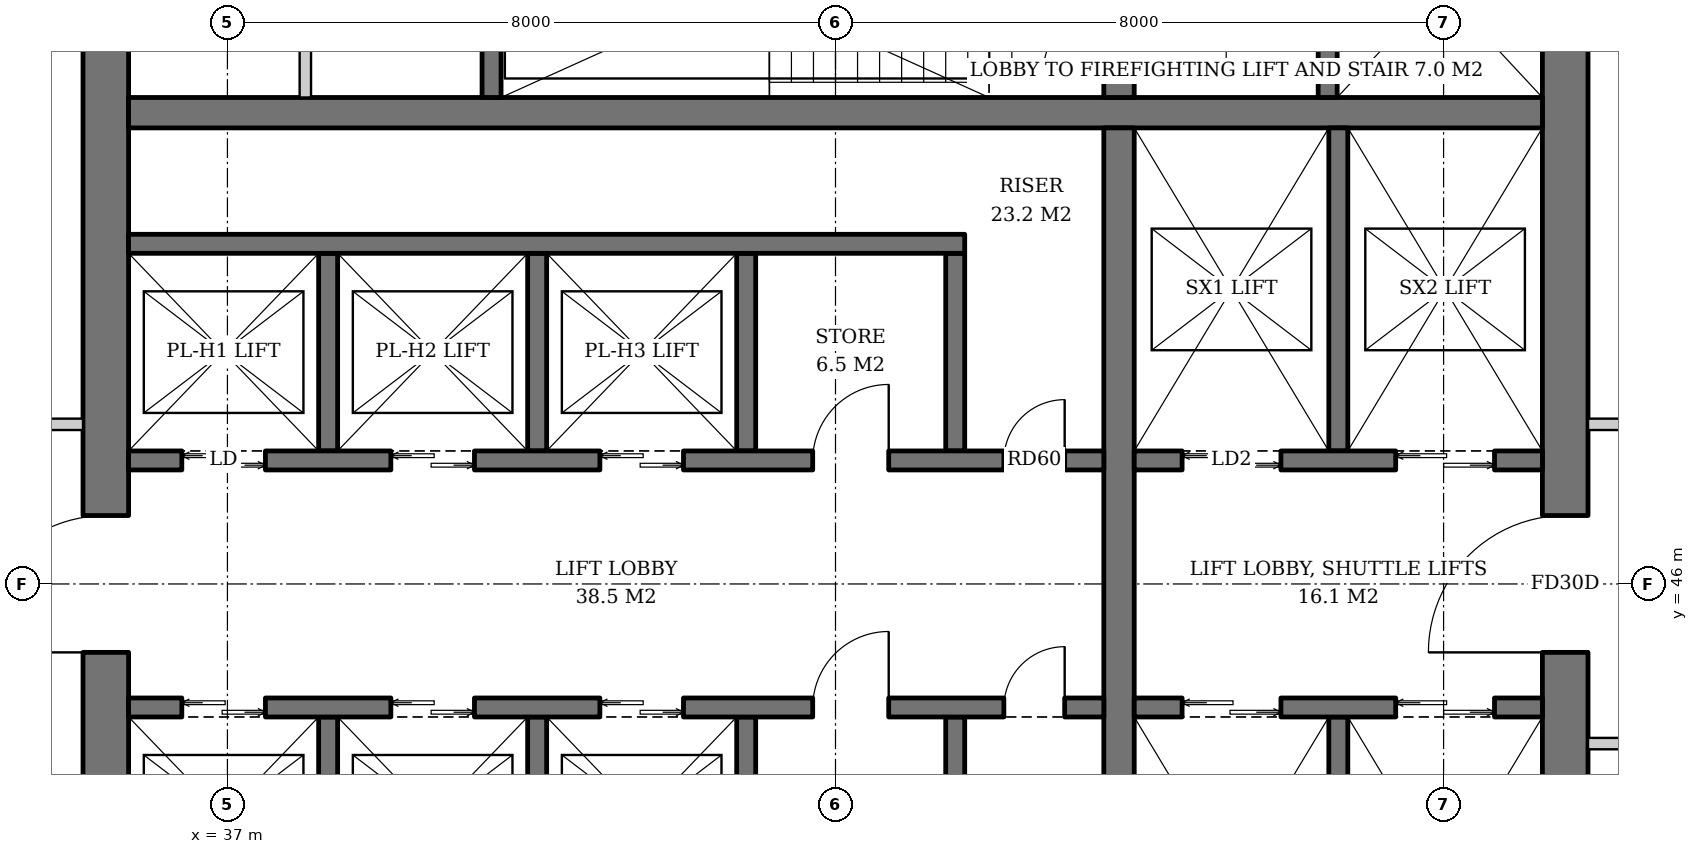
"""IFC4 building model, lengths in metres.
Left out: names, types, materials, properties, quantities, classifications, styles, units other than length and angle.
Written with IfcOpenShell. Run it as: python <this file> out.ifc"""

import sys

from ifc_helpers import new_model, si_unit, direction, frame, frame_2d, origin, place, context, subcontext, project, spatial, rectangle, extrude, element, fill, save


model = new_model("IFC4")
c1 = context("Model", 3, precision=1e-05, world=origin(), true_north=direction((0.0, 1.0)))
c2 = subcontext(c1, "Body", "Model", "MODEL_VIEW")
j1 = project(units=[si_unit("LENGTHUNIT", "METRE"), si_unit("PLANEANGLEUNIT", "RADIAN")], contexts=[c1])
p1 = place(None, origin())
s1 = spatial("IfcSite", under=j1, at=p1, CompositionType="ELEMENT")
p2 = place(p1, origin())
s2 = spatial("IfcBuilding", under=s1, at=p2, CompositionType="ELEMENT")
p3 = place(p2, frame((0.0, 0.0, 169.2)))
s3 = spatial("IfcBuildingStorey", under=s2, at=p3, CompositionType="ELEMENT", Elevation=169.2)
p4 = place(p3, frame((35.4, 36.7, 0.0), z_axis=(0.0, 0.0, 1.0), x_axis=(0.0, 1.0, 0.0)))
e1 = element("IfcWall", 1, at=p4, inside=s3, PredefinedType="SHEAR", context=c2, shape_type="SweptSolid", body=[
    extrude(rectangle(XDim=18.6, YDim=0.6, at=frame_2d((9.3, 0.0))), origin(), (0.0, 0.0, 1.0), 3.8),
])
p5 = place(p4, frame((8.4, 0.0, 0.0)))
e2 = element("IfcOpeningElement", 2, at=p5, cuts=e1, PredefinedType="OPENING", context=c2, shape_type="SweptSolid", body=[
    extrude(rectangle(XDim=1.8, YDim=2.4, at=frame_2d((0.9, 1.2))), frame((0.0, 0.31, 0.0), z_axis=(0.0, -1.0, 0.0), x_axis=(1.0, 0.0, 0.0)), (0.0, 0.0, 1.0), 0.62),
])
p6 = place(p3, frame((54.6, 36.7, 0.0), z_axis=(0.0, 0.0, 1.0), x_axis=(0.0, 1.0, 0.0)))
e3 = element("IfcWall", 3, at=p6, inside=s3, PredefinedType="SHEAR", context=c2, shape_type="SweptSolid", body=[
    extrude(rectangle(XDim=18.6, YDim=0.6, at=frame_2d((9.3, 0.0))), origin(), (0.0, 0.0, 1.0), 3.8),
])
p7 = place(p6, frame((8.4, 0.0, 0.0)))
e4 = element("IfcOpeningElement", 4, at=p7, cuts=e3, PredefinedType="OPENING", context=c2, shape_type="SweptSolid", body=[
    extrude(rectangle(XDim=1.8, YDim=2.4, at=frame_2d((0.9, 1.2))), frame((0.0, 0.31, 0.0), z_axis=(0.0, -1.0, 0.0), x_axis=(1.0, 0.0, 0.0)), (0.0, 0.0, 1.0), 0.62),
])
p8 = place(p3, frame((35.7, 52.2, 0.0), z_axis=(0.0, 0.0, 1.0), x_axis=(1.0, 0.0, 0.0)))
e5 = element("IfcWall", 5, at=p8, inside=s3, PredefinedType="SHEAR", context=c2, shape_type="SweptSolid", body=[
    extrude(rectangle(XDim=18.6, YDim=0.4, at=frame_2d((9.3, 0.0))), origin(), (0.0, 0.0, 1.0), 3.8),
])
p9 = place(p3, frame((48.73, 40.0, 0.0), z_axis=(0.0, 0.0, 1.0), x_axis=(0.0, 1.0, 0.0)))
e6 = element("IfcWall", 6, at=p9, inside=s3, PredefinedType="SHEAR", context=c2, shape_type="SweptSolid", body=[
    extrude(rectangle(XDim=12.0, YDim=0.4, at=frame_2d((6.0, 0.0))), origin(), (0.0, 0.0, 1.0), 3.8),
])
p10 = place(p3, frame((48.73, 52.4, 0.0), z_axis=(0.0, 0.0, 1.0), x_axis=(0.0, 1.0, 0.0)))
e7 = element("IfcWall", 7, at=p10, inside=s3, PredefinedType="SHEAR", context=c2, shape_type="SweptSolid", body=[
    extrude(rectangle(XDim=2.9, YDim=0.4, at=frame_2d((1.45, 0.0))), origin(), (0.0, 0.0, 1.0), 3.8),
])
p11 = place(p10, frame((0.3, 0.0, 0.0)))
e8 = element("IfcOpeningElement", 8, at=p11, cuts=e7, PredefinedType="OPENING", context=c2, shape_type="SweptSolid", body=[
    extrude(rectangle(XDim=1.0, YDim=2.1, at=frame_2d((0.5, 1.05))), frame((0.0, 0.21, 0.0), z_axis=(0.0, -1.0, 0.0), x_axis=(1.0, 0.0, 0.0)), (0.0, 0.0, 1.0), 0.42),
])
p12 = place(p3, frame((40.475, 52.4, 0.0), z_axis=(0.0, 0.0, 1.0), x_axis=(0.0, 1.0, 0.0)))
e9 = element("IfcWall", 9, at=p12, inside=s3, PredefinedType="SHEAR", context=c2, shape_type="SweptSolid", body=[
    extrude(rectangle(XDim=2.9, YDim=0.25, at=frame_2d((1.45, 0.0))), origin(), (0.0, 0.0, 1.0), 3.8),
])
p13 = place(p3, frame((51.475, 52.4, 0.0), z_axis=(0.0, 0.0, 1.0), x_axis=(0.0, 1.0, 0.0)))
e10 = element("IfcWall", 10, at=p13, inside=s3, PredefinedType="SHEAR", context=c2, shape_type="SweptSolid", body=[
    extrude(rectangle(XDim=2.9, YDim=0.25, at=frame_2d((1.45, 0.0))), origin(), (0.0, 0.0, 1.0), 3.8),
])
p14 = place(p13, frame((0.8, 0.0, 0.0)))
e11 = element("IfcOpeningElement", 11, at=p14, cuts=e10, PredefinedType="OPENING", context=c2, shape_type="SweptSolid", body=[
    extrude(rectangle(XDim=1.3, YDim=2.2, at=frame_2d((0.65, 1.1))), frame((0.0, 0.135, 0.0), z_axis=(0.0, -1.0, 0.0), x_axis=(1.0, 0.0, 0.0)), (0.0, 0.0, 1.0), 0.27),
])
for number, where, z_axis, x_axis in (
    (12, (38.325, 47.75, 0.0), (0.0, 0.0, 1.0), (0.0, 1.0, 0.0)),
    (13, (41.075, 47.75, 0.0), (0.0, 0.0, 1.0), (0.0, 1.0, 0.0)),
    (14, (43.825, 47.75, 0.0), (0.0, 0.0, 1.0), (0.0, 1.0, 0.0)),
    (15, (46.575, 47.75, 0.0), (0.0, 0.0, 1.0), (0.0, 1.0, 0.0)),
):
    element("IfcWall", number, at=place(p3, frame(where, z_axis=z_axis, x_axis=x_axis)), inside=s3, PredefinedType="SHEAR", context=c2, shape_type="SweptSolid", body=[
        extrude(rectangle(XDim=2.6, YDim=0.25, at=frame_2d((1.3, 0.0))), origin(), (0.0, 0.0, 1.0), 3.8),
    ])
p15 = place(p3, frame((35.7, 50.475, 0.0), z_axis=(0.0, 0.0, 1.0), x_axis=(1.0, 0.0, 0.0)))
e16 = element("IfcWall", 16, at=p15, inside=s3, PredefinedType="SHEAR", context=c2, shape_type="SweptSolid", body=[
    extrude(rectangle(XDim=11.0, YDim=0.25, at=frame_2d((5.5, 0.0))), origin(), (0.0, 0.0, 1.0), 3.8),
])
p16 = place(p3, frame((35.7, 47.625, 0.0), z_axis=(0.0, 0.0, 1.0), x_axis=(1.0, 0.0, 0.0)))
e17 = element("IfcWall", 17, at=p16, inside=s3, PredefinedType="SHEAR", context=c2, shape_type="SweptSolid", body=[
    extrude(rectangle(XDim=12.83, YDim=0.25, at=frame_2d((6.415, 0.0))), origin(), (0.0, 0.0, 1.0), 3.8),
])
p17 = place(p16, frame((0.7, 0.0, 0.0)))
e18 = element("IfcOpeningElement", 18, at=p17, cuts=e17, PredefinedType="OPENING", context=c2, shape_type="SweptSolid", body=[
    extrude(rectangle(XDim=1.1, YDim=2.2, at=frame_2d((0.55, 1.1))), frame((0.0, 0.135, 0.0), z_axis=(0.0, -1.0, 0.0), x_axis=(1.0, 0.0, 0.0)), (0.0, 0.0, 1.0), 0.27),
])
p18 = place(p16, frame((3.45, 0.0, 0.0)))
e19 = element("IfcOpeningElement", 19, at=p18, cuts=e17, PredefinedType="OPENING", context=c2, shape_type="SweptSolid", body=[
    extrude(rectangle(XDim=1.1, YDim=2.2, at=frame_2d((0.55, 1.1))), frame((0.0, 0.135, 0.0), z_axis=(0.0, -1.0, 0.0), x_axis=(1.0, 0.0, 0.0)), (0.0, 0.0, 1.0), 0.27),
])
p19 = place(p16, frame((6.2, 0.0, 0.0)))
e20 = element("IfcOpeningElement", 20, at=p19, cuts=e17, PredefinedType="OPENING", context=c2, shape_type="SweptSolid", body=[
    extrude(rectangle(XDim=1.1, YDim=2.2, at=frame_2d((0.55, 1.1))), frame((0.0, 0.135, 0.0), z_axis=(0.0, -1.0, 0.0), x_axis=(1.0, 0.0, 0.0)), (0.0, 0.0, 1.0), 0.27),
])
p20 = place(p16, frame((9.0, 0.0, 0.0)))
e21 = element("IfcOpeningElement", 21, at=p20, cuts=e17, PredefinedType="OPENING", context=c2, shape_type="SweptSolid", body=[
    extrude(rectangle(XDim=1.0, YDim=2.1, at=frame_2d((0.5, 1.05))), frame((0.0, 0.135, 0.0), z_axis=(0.0, -1.0, 0.0), x_axis=(1.0, 0.0, 0.0)), (0.0, 0.0, 1.0), 0.27),
])
p21 = place(p16, frame((11.515, 0.0, 0.0)))
e22 = element("IfcOpeningElement", 22, at=p21, cuts=e17, PredefinedType="OPENING", context=c2, shape_type="SweptSolid", body=[
    extrude(rectangle(XDim=0.8, YDim=2.0, at=frame_2d((0.4, 1.0))), frame((0.0, 0.135, 0.0), z_axis=(0.0, -1.0, 0.0), x_axis=(1.0, 0.0, 0.0)), (0.0, 0.0, 1.0), 0.27),
])
for number, where, z_axis, x_axis in (
    (23, (38.325, 44.25, 0.0), (0.0, 0.0, 1.0), (0.0, -1.0, 0.0)),
    (24, (41.075, 44.25, 0.0), (0.0, 0.0, 1.0), (0.0, -1.0, 0.0)),
    (25, (43.825, 44.25, 0.0), (0.0, 0.0, 1.0), (0.0, -1.0, 0.0)),
    (26, (46.575, 44.25, 0.0), (0.0, 0.0, 1.0), (0.0, -1.0, 0.0)),
):
    element("IfcWall", number, at=place(p3, frame(where, z_axis=z_axis, x_axis=x_axis)), inside=s3, PredefinedType="SHEAR", context=c2, shape_type="SweptSolid", body=[
        extrude(rectangle(XDim=2.6, YDim=0.25, at=frame_2d((1.3, 0.0))), origin(), (0.0, 0.0, 1.0), 3.8),
    ])
p22 = place(p3, frame((35.7, 44.375, 0.0), z_axis=(0.0, 0.0, 1.0), x_axis=(1.0, 0.0, 0.0)))
e27 = element("IfcWall", 27, at=p22, inside=s3, PredefinedType="SHEAR", context=c2, shape_type="SweptSolid", body=[
    extrude(rectangle(XDim=12.83, YDim=0.25, at=frame_2d((6.415, 0.0))), origin(), (0.0, 0.0, 1.0), 3.8),
])
p23 = place(p22, frame((0.7, 0.0, 0.0)))
e28 = element("IfcOpeningElement", 28, at=p23, cuts=e27, PredefinedType="OPENING", context=c2, shape_type="SweptSolid", body=[
    extrude(rectangle(XDim=1.1, YDim=2.2, at=frame_2d((0.55, 1.1))), frame((0.0, 0.135, 0.0), z_axis=(0.0, -1.0, 0.0), x_axis=(1.0, 0.0, 0.0)), (0.0, 0.0, 1.0), 0.27),
])
p24 = place(p22, frame((3.45, 0.0, 0.0)))
e29 = element("IfcOpeningElement", 29, at=p24, cuts=e27, PredefinedType="OPENING", context=c2, shape_type="SweptSolid", body=[
    extrude(rectangle(XDim=1.1, YDim=2.2, at=frame_2d((0.55, 1.1))), frame((0.0, 0.135, 0.0), z_axis=(0.0, -1.0, 0.0), x_axis=(1.0, 0.0, 0.0)), (0.0, 0.0, 1.0), 0.27),
])
p25 = place(p22, frame((6.2, 0.0, 0.0)))
e30 = element("IfcOpeningElement", 30, at=p25, cuts=e27, PredefinedType="OPENING", context=c2, shape_type="SweptSolid", body=[
    extrude(rectangle(XDim=1.1, YDim=2.2, at=frame_2d((0.55, 1.1))), frame((0.0, 0.135, 0.0), z_axis=(0.0, -1.0, 0.0), x_axis=(1.0, 0.0, 0.0)), (0.0, 0.0, 1.0), 0.27),
])
p26 = place(p22, frame((9.0, 0.0, 0.0)))
e31 = element("IfcOpeningElement", 31, at=p26, cuts=e27, PredefinedType="OPENING", context=c2, shape_type="SweptSolid", body=[
    extrude(rectangle(XDim=1.0, YDim=2.1, at=frame_2d((0.5, 1.05))), frame((0.0, 0.135, 0.0), z_axis=(0.0, -1.0, 0.0), x_axis=(1.0, 0.0, 0.0)), (0.0, 0.0, 1.0), 0.27),
])
p27 = place(p22, frame((11.515, 0.0, 0.0)))
e32 = element("IfcOpeningElement", 32, at=p27, cuts=e27, PredefinedType="OPENING", context=c2, shape_type="SweptSolid", body=[
    extrude(rectangle(XDim=0.8, YDim=2.0, at=frame_2d((0.4, 1.0))), frame((0.0, 0.135, 0.0), z_axis=(0.0, -1.0, 0.0), x_axis=(1.0, 0.0, 0.0)), (0.0, 0.0, 1.0), 0.27),
])
p28 = place(p3, frame((51.615, 47.75, 0.0), z_axis=(0.0, 0.0, 1.0), x_axis=(0.0, 1.0, 0.0)))
e33 = element("IfcWall", 33, at=p28, inside=s3, PredefinedType="SHEAR", context=c2, shape_type="SweptSolid", body=[
    extrude(rectangle(XDim=4.25, YDim=0.25, at=frame_2d((2.125, 0.0))), origin(), (0.0, 0.0, 1.0), 3.8),
])
p29 = place(p3, frame((48.93, 47.625, 0.0), z_axis=(0.0, 0.0, 1.0), x_axis=(1.0, 0.0, 0.0)))
e34 = element("IfcWall", 34, at=p29, inside=s3, PredefinedType="SHEAR", context=c2, shape_type="SweptSolid", body=[
    extrude(rectangle(XDim=5.37, YDim=0.25, at=frame_2d((2.685, 0.0))), origin(), (0.0, 0.0, 1.0), 3.8),
])
p30 = place(p29, frame((0.63, 0.0, 0.0)))
e35 = element("IfcOpeningElement", 35, at=p30, cuts=e34, PredefinedType="OPENING", context=c2, shape_type="SweptSolid", body=[
    extrude(rectangle(XDim=1.3, YDim=2.2, at=frame_2d((0.65, 1.1))), frame((0.0, 0.135, 0.0), z_axis=(0.0, -1.0, 0.0), x_axis=(1.0, 0.0, 0.0)), (0.0, 0.0, 1.0), 0.27),
])
p31 = place(p29, frame((3.44, 0.0, 0.0)))
e36 = element("IfcOpeningElement", 36, at=p31, cuts=e34, PredefinedType="OPENING", context=c2, shape_type="SweptSolid", body=[
    extrude(rectangle(XDim=1.3, YDim=2.2, at=frame_2d((0.65, 1.1))), frame((0.0, 0.135, 0.0), z_axis=(0.0, -1.0, 0.0), x_axis=(1.0, 0.0, 0.0)), (0.0, 0.0, 1.0), 0.27),
])
p32 = place(p3, frame((51.615, 44.25, 0.0), z_axis=(0.0, 0.0, 1.0), x_axis=(0.0, -1.0, 0.0)))
e37 = element("IfcWall", 37, at=p32, inside=s3, PredefinedType="SHEAR", context=c2, shape_type="SweptSolid", body=[
    extrude(rectangle(XDim=4.25, YDim=0.25, at=frame_2d((2.125, 0.0))), origin(), (0.0, 0.0, 1.0), 3.8),
])
p33 = place(p3, frame((48.93, 44.375, 0.0), z_axis=(0.0, 0.0, 1.0), x_axis=(1.0, 0.0, 0.0)))
e38 = element("IfcWall", 38, at=p33, inside=s3, PredefinedType="SHEAR", context=c2, shape_type="SweptSolid", body=[
    extrude(rectangle(XDim=5.37, YDim=0.25, at=frame_2d((2.685, 0.0))), origin(), (0.0, 0.0, 1.0), 3.8),
])
p34 = place(p33, frame((0.63, 0.0, 0.0)))
e39 = element("IfcOpeningElement", 39, at=p34, cuts=e38, PredefinedType="OPENING", context=c2, shape_type="SweptSolid", body=[
    extrude(rectangle(XDim=1.3, YDim=2.2, at=frame_2d((0.65, 1.1))), frame((0.0, 0.135, 0.0), z_axis=(0.0, -1.0, 0.0), x_axis=(1.0, 0.0, 0.0)), (0.0, 0.0, 1.0), 0.27),
])
p35 = place(p33, frame((3.44, 0.0, 0.0)))
e40 = element("IfcOpeningElement", 40, at=p35, cuts=e38, PredefinedType="OPENING", context=c2, shape_type="SweptSolid", body=[
    extrude(rectangle(XDim=1.3, YDim=2.2, at=frame_2d((0.65, 1.1))), frame((0.0, 0.135, 0.0), z_axis=(0.0, -1.0, 0.0), x_axis=(1.0, 0.0, 0.0)), (0.0, 0.0, 1.0), 0.27),
])
p36 = place(p3, frame((38.025, 52.4, 0.0), z_axis=(0.0, 0.0, 1.0), x_axis=(0.0, 1.0, 0.0)))
e41 = element("IfcWall", 41, at=p36, inside=s3, PredefinedType="SOLIDWALL", context=c2, shape_type="SweptSolid", body=[
    extrude(rectangle(XDim=2.9, YDim=0.15, at=frame_2d((1.45, 0.0))), origin(), (0.0, 0.0, 1.0), 3.62),
])
for number, where, z_axis, x_axis in (
    (42, (54.9, 43.9, 0.0), (0.0, 0.0, 1.0), (1.0, 0.0, 0.0)),
    (43, (54.9, 48.1, 0.0), (0.0, 0.0, 1.0), (1.0, 0.0, 0.0)),
    (44, (35.1, 48.1, 0.0), (0.0, 0.0, 1.0), (-1.0, 0.0, 0.0)),
):
    element("IfcWall", number, at=place(p3, frame(where, z_axis=z_axis, x_axis=x_axis)), inside=s3, PredefinedType="PARTITIONING", context=c2, shape_type="SweptSolid", body=[
        extrude(rectangle(XDim=2.325, YDim=0.15, at=frame_2d((1.163, 0.0))), origin(), (0.0, 0.0, 1.0), 3.62),
    ])
p37 = place(p17, origin())
e45 = element("IfcDoor", 45, at=p37, inside=s3, OperationType="DOUBLE_DOOR_SLIDING", PredefinedType="DOOR", context=c2, shape_type="SweptSolid", body=[
    extrude(rectangle(XDim=1.1, YDim=2.2, at=frame_2d((0.55, 1.1))), frame((0.0, 0.025, 0.0), z_axis=(0.0, -1.0, 0.0), x_axis=(1.0, 0.0, 0.0)), (0.0, 0.0, 1.0), 0.05),
])
fill(e18, e45)
p38 = place(p18, origin())
e46 = element("IfcDoor", 46, at=p38, inside=s3, OperationType="DOUBLE_DOOR_SLIDING", PredefinedType="DOOR", context=c2, shape_type="SweptSolid", body=[
    extrude(rectangle(XDim=1.1, YDim=2.2, at=frame_2d((0.55, 1.1))), frame((0.0, 0.025, 0.0), z_axis=(0.0, -1.0, 0.0), x_axis=(1.0, 0.0, 0.0)), (0.0, 0.0, 1.0), 0.05),
])
fill(e19, e46)
p39 = place(p19, origin())
e47 = element("IfcDoor", 47, at=p39, inside=s3, OperationType="DOUBLE_DOOR_SLIDING", PredefinedType="DOOR", context=c2, shape_type="SweptSolid", body=[
    extrude(rectangle(XDim=1.1, YDim=2.2, at=frame_2d((0.55, 1.1))), frame((0.0, 0.025, 0.0), z_axis=(0.0, -1.0, 0.0), x_axis=(1.0, 0.0, 0.0)), (0.0, 0.0, 1.0), 0.05),
])
fill(e20, e47)
p40 = place(p20, origin())
e48 = element("IfcDoor", 48, at=p40, inside=s3, OperationType="SINGLE_SWING_RIGHT", PredefinedType="DOOR", context=c2, shape_type="SweptSolid", body=[
    extrude(rectangle(XDim=1.0, YDim=2.1, at=frame_2d((0.5, 1.05))), frame((0.0, 0.025, 0.0), z_axis=(0.0, -1.0, 0.0), x_axis=(1.0, 0.0, 0.0)), (0.0, 0.0, 1.0), 0.05),
])
fill(e21, e48)
p41 = place(p21, origin())
e49 = element("IfcDoor", 49, at=p41, inside=s3, OperationType="SINGLE_SWING_RIGHT", PredefinedType="DOOR", context=c2, shape_type="SweptSolid", body=[
    extrude(rectangle(XDim=0.8, YDim=2.0, at=frame_2d((0.4, 1.0))), frame((0.0, 0.025, 0.0), z_axis=(0.0, -1.0, 0.0), x_axis=(1.0, 0.0, 0.0)), (0.0, 0.0, 1.0), 0.05),
])
fill(e22, e49)
p42 = place(p23, origin())
e50 = element("IfcDoor", 50, at=p42, inside=s3, OperationType="DOUBLE_DOOR_SLIDING", PredefinedType="DOOR", context=c2, shape_type="SweptSolid", body=[
    extrude(rectangle(XDim=1.1, YDim=2.2, at=frame_2d((0.55, 1.1))), frame((0.0, 0.025, 0.0), z_axis=(0.0, -1.0, 0.0), x_axis=(1.0, 0.0, 0.0)), (0.0, 0.0, 1.0), 0.05),
])
fill(e28, e50)
p43 = place(p24, origin())
e51 = element("IfcDoor", 51, at=p43, inside=s3, OperationType="DOUBLE_DOOR_SLIDING", PredefinedType="DOOR", context=c2, shape_type="SweptSolid", body=[
    extrude(rectangle(XDim=1.1, YDim=2.2, at=frame_2d((0.55, 1.1))), frame((0.0, 0.025, 0.0), z_axis=(0.0, -1.0, 0.0), x_axis=(1.0, 0.0, 0.0)), (0.0, 0.0, 1.0), 0.05),
])
fill(e29, e51)
p44 = place(p25, origin())
e52 = element("IfcDoor", 52, at=p44, inside=s3, OperationType="DOUBLE_DOOR_SLIDING", PredefinedType="DOOR", context=c2, shape_type="SweptSolid", body=[
    extrude(rectangle(XDim=1.1, YDim=2.2, at=frame_2d((0.55, 1.1))), frame((0.0, 0.025, 0.0), z_axis=(0.0, -1.0, 0.0), x_axis=(1.0, 0.0, 0.0)), (0.0, 0.0, 1.0), 0.05),
])
fill(e30, e52)
p45 = place(p26, origin())
e53 = element("IfcDoor", 53, at=p45, inside=s3, OperationType="SINGLE_SWING_RIGHT", PredefinedType="DOOR", context=c2, shape_type="SweptSolid", body=[
    extrude(rectangle(XDim=1.0, YDim=2.1, at=frame_2d((0.5, 1.05))), frame((0.0, 0.025, 0.0), z_axis=(0.0, -1.0, 0.0), x_axis=(1.0, 0.0, 0.0)), (0.0, 0.0, 1.0), 0.05),
])
fill(e31, e53)
p46 = place(p27, origin())
e54 = element("IfcDoor", 54, at=p46, inside=s3, OperationType="SINGLE_SWING_RIGHT", PredefinedType="DOOR", context=c2, shape_type="SweptSolid", body=[
    extrude(rectangle(XDim=0.8, YDim=2.0, at=frame_2d((0.4, 1.0))), frame((0.0, 0.025, 0.0), z_axis=(0.0, -1.0, 0.0), x_axis=(1.0, 0.0, 0.0)), (0.0, 0.0, 1.0), 0.05),
])
fill(e32, e54)
p47 = place(p30, origin())
e55 = element("IfcDoor", 55, at=p47, inside=s3, OperationType="DOUBLE_DOOR_SLIDING", PredefinedType="DOOR", context=c2, shape_type="SweptSolid", body=[
    extrude(rectangle(XDim=1.3, YDim=2.2, at=frame_2d((0.65, 1.1))), frame((0.0, 0.025, 0.0), z_axis=(0.0, -1.0, 0.0), x_axis=(1.0, 0.0, 0.0)), (0.0, 0.0, 1.0), 0.05),
])
fill(e35, e55)
p48 = place(p31, origin())
e56 = element("IfcDoor", 56, at=p48, inside=s3, OperationType="DOUBLE_DOOR_SLIDING", PredefinedType="DOOR", context=c2, shape_type="SweptSolid", body=[
    extrude(rectangle(XDim=1.3, YDim=2.2, at=frame_2d((0.65, 1.1))), frame((0.0, 0.025, 0.0), z_axis=(0.0, -1.0, 0.0), x_axis=(1.0, 0.0, 0.0)), (0.0, 0.0, 1.0), 0.05),
])
fill(e36, e56)
p49 = place(p34, origin())
e57 = element("IfcDoor", 57, at=p49, inside=s3, OperationType="DOUBLE_DOOR_SLIDING", PredefinedType="DOOR", context=c2, shape_type="SweptSolid", body=[
    extrude(rectangle(XDim=1.3, YDim=2.2, at=frame_2d((0.65, 1.1))), frame((0.0, 0.025, 0.0), z_axis=(0.0, -1.0, 0.0), x_axis=(1.0, 0.0, 0.0)), (0.0, 0.0, 1.0), 0.05),
])
fill(e39, e57)
p50 = place(p35, origin())
e58 = element("IfcDoor", 58, at=p50, inside=s3, OperationType="DOUBLE_DOOR_SLIDING", PredefinedType="DOOR", context=c2, shape_type="SweptSolid", body=[
    extrude(rectangle(XDim=1.3, YDim=2.2, at=frame_2d((0.65, 1.1))), frame((0.0, 0.025, 0.0), z_axis=(0.0, -1.0, 0.0), x_axis=(1.0, 0.0, 0.0)), (0.0, 0.0, 1.0), 0.05),
])
fill(e40, e58)
p51 = place(p11, origin())
e59 = element("IfcDoor", 59, at=p51, inside=s3, OperationType="SINGLE_SWING_LEFT", PredefinedType="DOOR", context=c2, shape_type="SweptSolid", body=[
    extrude(rectangle(XDim=1.0, YDim=2.1, at=frame_2d((0.5, 1.05))), frame((0.0, 0.025, 0.0), z_axis=(0.0, -1.0, 0.0), x_axis=(1.0, 0.0, 0.0)), (0.0, 0.0, 1.0), 0.05),
])
fill(e8, e59)
p52 = place(p5, origin())
e60 = element("IfcDoor", 60, at=p52, inside=s3, OperationType="DOUBLE_DOOR_SINGLE_SWING", PredefinedType="DOOR", context=c2, shape_type="SweptSolid", body=[
    extrude(rectangle(XDim=1.8, YDim=2.4, at=frame_2d((0.9, 1.2))), frame((0.0, 0.025, 0.0), z_axis=(0.0, -1.0, 0.0), x_axis=(1.0, 0.0, 0.0)), (0.0, 0.0, 1.0), 0.05),
])
fill(e2, e60)
p53 = place(p7, origin())
e61 = element("IfcDoor", 61, at=p53, inside=s3, OperationType="DOUBLE_DOOR_SINGLE_SWING", PredefinedType="DOOR", context=c2, shape_type="SweptSolid", body=[
    extrude(rectangle(XDim=1.8, YDim=2.4, at=frame_2d((0.9, 1.2))), frame((0.0, 0.025, 0.0), z_axis=(0.0, -1.0, 0.0), x_axis=(1.0, 0.0, 0.0)), (0.0, 0.0, 1.0), 0.05),
])
fill(e4, e61)
save(model, sys.argv[1])
